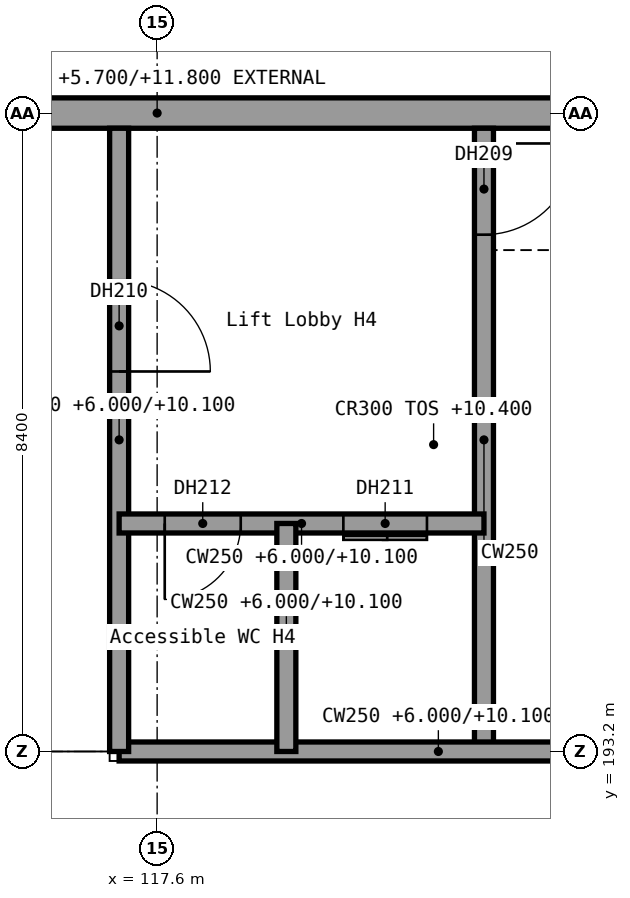
"""IFC4 building model, lengths in metres.
Left out: names, types, materials, properties, quantities, classifications, styles, units other than length and angle.
Written with IfcOpenShell. Run it as: python <this file> out.ifc"""

import sys

from ifc_helpers import new_model, si_unit, direction, frame, frame_2d, origin, place, context, subcontext, project, spatial, rectangle, extrude, element, fill, save


model = new_model("IFC4")
c1 = context("Model", 3, precision=1e-05, world=origin(), true_north=direction((0.0, 1.0)))
c2 = subcontext(c1, "Body", "Model", "MODEL_VIEW")
j1 = project(units=[si_unit("LENGTHUNIT", "METRE"), si_unit("PLANEANGLEUNIT", "RADIAN")], contexts=[c1])
p1 = place(None, origin())
s1 = spatial("IfcSite", under=j1, at=p1, CompositionType="ELEMENT")
p2 = place(p1, origin())
s2 = spatial("IfcBuilding", under=s1, at=p2, CompositionType="ELEMENT")
p3 = place(p2, frame((0.0, 0.0, 6.0)))
s3 = spatial("IfcBuildingStorey", under=s2, at=p3, CompositionType="ELEMENT", Elevation=6.0)
p4 = place(p3, frame((109.7, 201.6, -0.3), z_axis=(0.0, 0.0, 1.0), x_axis=(1.0, 0.0, 0.0)))
e1 = element("IfcWall", 1, at=p4, inside=s3, PredefinedType="STANDARD", context=c2, shape_type="SweptSolid", body=[
    extrude(rectangle(XDim=15.8, YDim=0.4, at=frame_2d((7.9, 0.0))), origin(), (0.0, 0.0, 1.0), 6.1),
])
p5 = place(p3, frame((121.9, 201.4, 0.0), z_axis=(0.0, 0.0, 1.0), x_axis=(0.0, -1.0, 0.0)))
e2 = element("IfcWall", 2, at=p5, inside=s3, PredefinedType="SHEAR", context=c2, shape_type="SweptSolid", body=[
    extrude(rectangle(XDim=8.2, YDim=0.25, at=frame_2d((4.1, 0.0))), origin(), (0.0, 0.0, 1.0), 4.1),
])
p6 = place(p5, frame((0.2, 0.0, 0.0)))
e3 = element("IfcOpeningElement", 3, at=p6, cuts=e2, PredefinedType="OPENING", context=c2, shape_type="SweptSolid", body=[
    extrude(rectangle(XDim=1.2, YDim=2.1, at=frame_2d((0.6, 1.05))), frame((0.0, 0.125, 0.0), z_axis=(0.0, -1.0, 0.0), x_axis=(1.0, 0.0, 0.0)), (0.0, 0.0, 1.0), 0.25),
])
p7 = place(p3, frame((125.5, 193.2, 0.0), z_axis=(0.0, 0.0, 1.0), x_axis=(-1.0, 0.0, 0.0)))
e4 = element("IfcWall", 4, at=p7, inside=s3, PredefinedType="SHEAR", context=c2, shape_type="SweptSolid", body=[
    extrude(rectangle(XDim=8.4, YDim=0.25, at=frame_2d((4.2, 0.0))), origin(), (0.0, 0.0, 1.0), 4.1),
])
p8 = place(p3, frame((117.1, 201.4, 0.0), z_axis=(0.0, 0.0, 1.0), x_axis=(0.0, -1.0, 0.0)))
e5 = element("IfcWall", 5, at=p8, inside=s3, PredefinedType="SHEAR", context=c2, shape_type="SweptSolid", body=[
    extrude(rectangle(XDim=8.2, YDim=0.25, at=frame_2d((4.1, 0.0))), origin(), (0.0, 0.0, 1.0), 4.1),
])
p9 = place(p8, frame((2.0, 0.0, 0.0)))
e6 = element("IfcOpeningElement", 6, at=p9, cuts=e5, PredefinedType="OPENING", context=c2, shape_type="SweptSolid", body=[
    extrude(rectangle(XDim=1.2, YDim=2.1, at=frame_2d((0.6, 1.05))), frame((0.0, 0.125, 0.0), z_axis=(0.0, -1.0, 0.0), x_axis=(1.0, 0.0, 0.0)), (0.0, 0.0, 1.0), 0.25),
])
p10 = place(p3, frame((121.9, 196.2, 0.0), z_axis=(0.0, 0.0, 1.0), x_axis=(-1.0, 0.0, 0.0)))
e7 = element("IfcWall", 7, at=p10, inside=s3, PredefinedType="SHEAR", context=c2, shape_type="SweptSolid", body=[
    extrude(rectangle(XDim=4.8, YDim=0.25, at=frame_2d((2.4, 0.0))), origin(), (0.0, 0.0, 1.0), 4.1),
])
p11 = place(p10, frame((0.75, 0.0, 0.0)))
e8 = element("IfcOpeningElement", 8, at=p11, cuts=e7, PredefinedType="OPENING", context=c2, shape_type="SweptSolid", body=[
    extrude(rectangle(XDim=1.1, YDim=2.1, at=frame_2d((0.55, 1.05))), frame((0.0, 0.125, 0.0), z_axis=(0.0, -1.0, 0.0), x_axis=(1.0, 0.0, 0.0)), (0.0, 0.0, 1.0), 0.25),
])
p12 = place(p10, frame((3.2, 0.0, 0.0)))
e9 = element("IfcOpeningElement", 9, at=p12, cuts=e7, PredefinedType="OPENING", context=c2, shape_type="SweptSolid", body=[
    extrude(rectangle(XDim=1.0, YDim=2.1, at=frame_2d((0.5, 1.05))), frame((0.0, 0.125, 0.0), z_axis=(0.0, -1.0, 0.0), x_axis=(1.0, 0.0, 0.0)), (0.0, 0.0, 1.0), 0.25),
])
p13 = place(p3, frame((119.3, 196.2, 0.0), z_axis=(0.0, 0.0, 1.0), x_axis=(0.0, -1.0, 0.0)))
e10 = element("IfcWall", 10, at=p13, inside=s3, PredefinedType="SHEAR", context=c2, shape_type="SweptSolid", body=[
    extrude(rectangle(XDim=3.0, YDim=0.25, at=frame_2d((1.5, 0.0))), origin(), (0.0, 0.0, 1.0), 4.1),
])
p14 = place(p6, origin())
e11 = element("IfcDoor", 11, at=p14, inside=s3, OperationType="SINGLE_SWING_LEFT", PredefinedType="DOOR", context=c2, shape_type="SweptSolid", body=[
    extrude(rectangle(XDim=1.2, YDim=2.1, at=frame_2d((0.6, 1.05))), frame((0.0, 0.025, 0.0), z_axis=(0.0, -1.0, 0.0), x_axis=(1.0, 0.0, 0.0)), (0.0, 0.0, 1.0), 0.05),
])
fill(e3, e11)
p15 = place(p9, origin())
e12 = element("IfcDoor", 12, at=p15, inside=s3, OperationType="SINGLE_SWING_LEFT", PredefinedType="DOOR", context=c2, shape_type="SweptSolid", body=[
    extrude(rectangle(XDim=1.2, YDim=2.1, at=frame_2d((0.6, 1.05))), frame((0.0, 0.025, 0.0), z_axis=(0.0, -1.0, 0.0), x_axis=(1.0, 0.0, 0.0)), (0.0, 0.0, 1.0), 0.05),
])
fill(e6, e12)
p16 = place(p11, origin())
e13 = element("IfcDoor", 13, at=p16, inside=s3, OperationType="DOUBLE_DOOR_SLIDING", PredefinedType="DOOR", context=c2, shape_type="SweptSolid", body=[
    extrude(rectangle(XDim=1.1, YDim=2.1, at=frame_2d((0.55, 1.05))), frame((0.0, 0.025, 0.0), z_axis=(0.0, -1.0, 0.0), x_axis=(1.0, 0.0, 0.0)), (0.0, 0.0, 1.0), 0.05),
])
fill(e8, e13)
p17 = place(p12, origin())
e14 = element("IfcDoor", 14, at=p17, inside=s3, OperationType="SINGLE_SWING_RIGHT", PredefinedType="DOOR", context=c2, shape_type="SweptSolid", body=[
    extrude(rectangle(XDim=1.0, YDim=2.1, at=frame_2d((0.5, 1.05))), frame((0.0, 0.025, 0.0), z_axis=(0.0, -1.0, 0.0), x_axis=(1.0, 0.0, 0.0)), (0.0, 0.0, 1.0), 0.05),
])
fill(e9, e14)
save(model, sys.argv[1])
